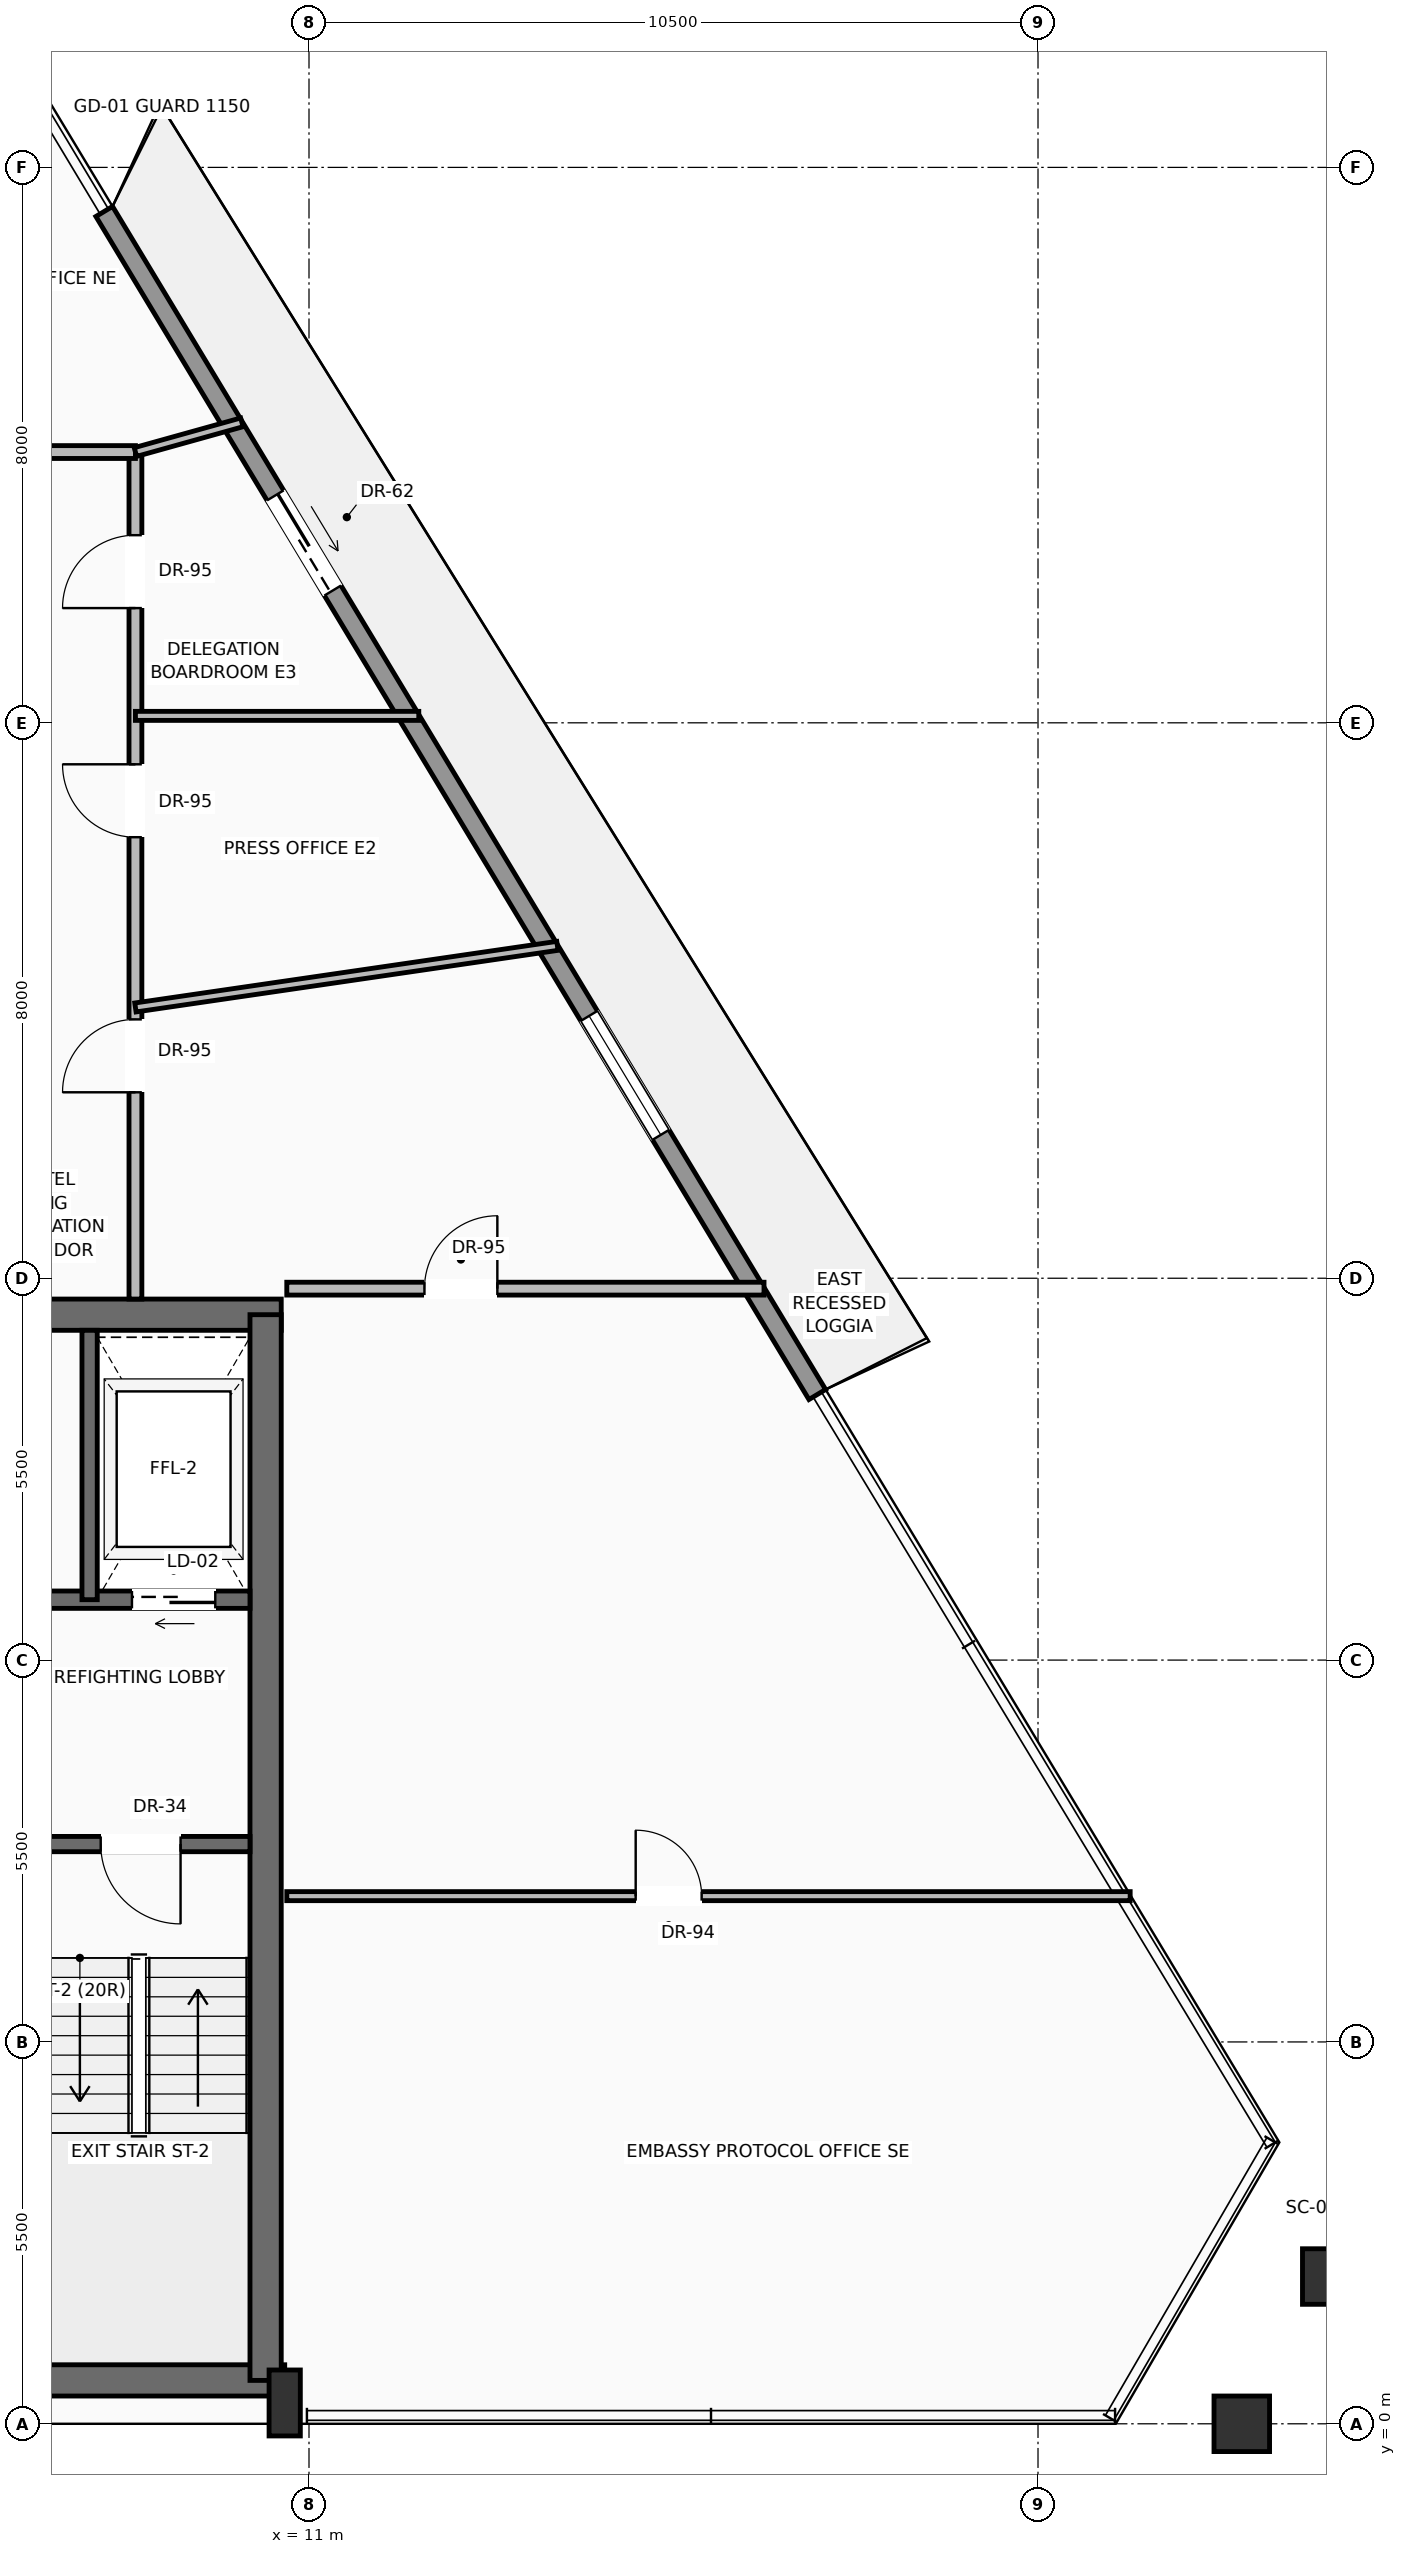
"""IFC4 building model, lengths in metres.
Left out: names, types, materials, properties, quantities, classifications, styles, units other than length and angle.
Written with IfcOpenShell. Run it as: python <this file> out.ifc"""

import sys

from ifc_helpers import new_model, si_unit, direction, frame, frame_2d, origin, origin_2d, place, context, subcontext, project, spatial, rectangle, hollow_rectangle, extrude, source, transform, mapped, element, fill, save


model = new_model("IFC4")
c1 = context("Model", 3, precision=1e-05, world=origin(), true_north=direction((0.0, 1.0)))
c2 = subcontext(c1, "Body", "Model", "MODEL_VIEW")
j1 = project(units=[si_unit("LENGTHUNIT", "METRE"), si_unit("PLANEANGLEUNIT", "RADIAN")], contexts=[c1])
p1 = place(None, origin())
s1 = spatial("IfcSite", under=j1, at=p1, CompositionType="ELEMENT")
p2 = place(p1, origin())
s2 = spatial("IfcBuilding", under=s1, at=p2, CompositionType="ELEMENT")
p3 = place(p2, frame((0.0, 0.0, 262.65)))
s3 = spatial("IfcBuildingStorey", under=s2, at=p3, CompositionType="ELEMENT", Elevation=262.65)
p4 = place(p3, frame((-10.65, 0.625, 0.0), z_axis=(0.0, 0.0, 1.0), x_axis=(1.0, 0.0, 0.0)))
e1 = element("IfcWall", 1, at=p4, inside=s3, PredefinedType="SHEAR", context=c2, shape_type="SweptSolid", body=[
    extrude(rectangle(XDim=21.3, YDim=0.45, at=frame_2d((10.65, 0.0))), origin(), (0.0, 0.0, 1.0), 3.24),
])
p5 = place(p3, frame((-10.6, 15.975, 0.0), z_axis=(0.0, 0.0, 1.0), x_axis=(1.0, 0.0, 0.0)))
e2 = element("IfcWall", 2, at=p5, inside=s3, PredefinedType="SHEAR", context=c2, shape_type="SweptSolid", body=[
    extrude(rectangle(XDim=21.2, YDim=0.45, at=frame_2d((10.6, 0.0))), origin(), (0.0, 0.0, 1.0), 3.24),
])
p6 = place(p5, frame((3.17, 0.0, 0.0)))
e3 = element("IfcOpeningElement", 3, at=p6, cuts=e2, PredefinedType="OPENING", context=c2, shape_type="SweptSolid", body=[
    extrude(rectangle(XDim=1.3, YDim=2.3, at=frame_2d((0.65, 1.15))), frame((0.0, 0.235, 0.0), z_axis=(0.0, -1.0, 0.0), x_axis=(1.0, 0.0, 0.0)), (0.0, 0.0, 1.0), 0.47),
])
p7 = place(p5, frame((9.6, 0.0, 0.0)))
e4 = element("IfcOpeningElement", 4, at=p7, cuts=e2, PredefinedType="OPENING", context=c2, shape_type="SweptSolid", body=[
    extrude(rectangle(XDim=2.0, YDim=2.4, at=frame_2d((1.0, 1.2))), frame((0.0, 0.235, 0.0), z_axis=(0.0, -1.0, 0.0), x_axis=(1.0, 0.0, 0.0)), (0.0, 0.0, 1.0), 0.47),
])
p8 = place(p3, frame((10.375, 0.625, 0.0), z_axis=(0.0, 0.0, 1.0), x_axis=(0.0, 1.0, 0.0)))
e5 = element("IfcWall", 5, at=p8, inside=s3, PredefinedType="SHEAR", context=c2, shape_type="SweptSolid", body=[
    extrude(rectangle(XDim=15.35, YDim=0.45, at=frame_2d((7.675, 0.0))), origin(), (0.0, 0.0, 1.0), 3.24),
])
m1 = source(origin(), c2, "Body", "SweptSolid", [
    extrude(rectangle(XDim=0.45, YDim=0.95, at=origin_2d()), origin(), (0.0, 0.0, 1.0), 3.45),
])
p9 = place(p3, frame((10.65, 0.3, 0.0), z_axis=(0.0, 0.0, 1.0), x_axis=(1.0, 0.0, 0.0)))
e6 = element("IfcColumn", 6, at=p9, inside=s3, PredefinedType="PILASTER", context=c2, shape_type="MappedRepresentation", body=[
    mapped(m1, transform((0.0, 0.0, 0.0), scale=1.0)),
])
m2 = source(origin(), c2, "Body", "SweptSolid", [
    extrude(hollow_rectangle(XDim=0.8, YDim=0.8, WallThickness=0.04, at=origin_2d()), origin(), (0.0, 0.0, 1.0), 3.441),
])
p10 = place(p3, frame((24.435, 0.0, 0.004), z_axis=(-0.001347898889, 0.0, 0.999999091584), x_axis=(1.0, 0.0, 0.0)))
e7 = element("IfcColumn", 7, at=p10, inside=s3, PredefinedType="COLUMN", context=c2, shape_type="MappedRepresentation", body=[
    mapped(m2, transform((0.0, 0.0, 0.0), scale=1.0)),
])
m3 = source(origin(), c2, "Body", "SweptSolid", [
    extrude(hollow_rectangle(XDim=0.8, YDim=0.8, WallThickness=0.04, at=origin_2d()), origin(), (0.0, 0.0, 1.0), 3.442),
])
p11 = place(p3, frame((25.709, 2.121, 0.004), z_axis=(-0.011490412596, -0.015887977911, 0.999807752809), x_axis=(0.810297504985, -0.586018731284, 0.0)))
e8 = element("IfcColumn", 8, at=p11, inside=s3, PredefinedType="COLUMN", context=c2, shape_type="MappedRepresentation", body=[
    mapped(m3, transform((0.0, 0.0, 0.0), scale=1.0)),
])
p12 = place(p3, frame((8.051, 31.865, 0.0), z_axis=(0.0, 0.0, 1.0), x_axis=(0.516203649231, -0.856465873529, 0.0)))
e9 = element("IfcWall", 9, at=p12, inside=s3, PredefinedType="SOLIDWALL", context=c2, shape_type="SweptSolid", body=[
    extrude(rectangle(XDim=19.896, YDim=0.28, at=frame_2d((9.948, 0.0))), origin(), (0.0, 0.0, 1.0), 2.82),
])
p13 = place(p12, frame((4.775, 0.0, 0.0)))
e10 = element("IfcOpeningElement", 10, at=p13, cuts=e9, PredefinedType="OPENING", context=c2, shape_type="SweptSolid", body=[
    extrude(rectangle(XDim=1.6, YDim=2.35, at=frame_2d((0.8, 1.175))), frame((0.0, 0.15, 0.0), z_axis=(0.0, -1.0, 0.0), x_axis=(1.0, 0.0, 0.0)), (0.0, 0.0, 1.0), 0.3),
])
p14 = place(p12, frame((13.529, 0.0, 0.9)))
e11 = element("IfcOpeningElement", 11, at=p14, cuts=e9, PredefinedType="OPENING", context=c2, shape_type="SweptSolid", body=[
    extrude(rectangle(XDim=2.0, YDim=1.75, at=frame_2d((1.0, 0.875))), frame((0.0, 0.15, 0.0), z_axis=(0.0, -1.0, 0.0), x_axis=(1.0, 0.0, 0.0)), (0.0, 0.0, 1.0), 0.3),
])
p15 = place(p3, frame((10.15, 8.35, 0.0), z_axis=(0.0, 0.0, 1.0), x_axis=(-1.0, 0.0, 0.0)))
e12 = element("IfcWall", 12, at=p15, inside=s3, PredefinedType="SOLIDWALL", context=c2, shape_type="SweptSolid", body=[
    extrude(rectangle(XDim=4.65, YDim=0.22, at=frame_2d((2.325, 0.0))), origin(), (0.0, 0.0, 1.0), 3.24),
])
p16 = place(p15, frame((1.0, 0.0, 0.0)))
e13 = element("IfcOpeningElement", 13, at=p16, cuts=e12, PredefinedType="OPENING", context=c2, shape_type="SweptSolid", body=[
    extrude(rectangle(XDim=1.15, YDim=2.2, at=frame_2d((0.575, 1.1))), frame((0.0, 0.12, 0.0), z_axis=(0.0, -1.0, 0.0), x_axis=(1.0, 0.0, 0.0)), (0.0, 0.0, 1.0), 0.24),
])
p17 = place(p3, frame((10.15, 11.87, 0.0), z_axis=(0.0, 0.0, 1.0), x_axis=(-1.0, 0.0, 0.0)))
e14 = element("IfcWall", 14, at=p17, inside=s3, PredefinedType="SOLIDWALL", context=c2, shape_type="SweptSolid", body=[
    extrude(rectangle(XDim=4.65, YDim=0.25, at=frame_2d((2.325, 0.0))), origin(), (0.0, 0.0, 1.0), 3.24),
])
p18 = place(p17, frame((0.5, 0.0, 0.0)))
e15 = element("IfcOpeningElement", 15, at=p18, cuts=e14, PredefinedType="OPENING", context=c2, shape_type="SweptSolid", body=[
    extrude(rectangle(XDim=1.2, YDim=2.25, at=frame_2d((0.6, 1.125))), frame((0.0, 0.135, 0.0), z_axis=(0.0, -1.0, 0.0), x_axis=(1.0, 0.0, 0.0)), (0.0, 0.0, 1.0), 0.27),
])
p19 = place(p3, frame((7.84, 11.87, 0.0), z_axis=(0.0, 0.0, 1.0), x_axis=(0.0, 1.0, 0.0)))
e16 = element("IfcWall", 16, at=p19, inside=s3, PredefinedType="SOLIDWALL", context=c2, shape_type="SweptSolid", body=[
    extrude(rectangle(XDim=3.88, YDim=0.22, at=frame_2d((1.94, 0.0))), origin(), (0.0, 0.0, 1.0), 3.24),
])
p20 = place(p3, frame((8.5, 16.2, 0.0), z_axis=(0.0, 0.0, 1.0), x_axis=(0.0, 1.0, 0.0)))
e17 = element("IfcWall", 17, at=p20, inside=s3, PredefinedType="PARTITIONING", context=c2, shape_type="SweptSolid", body=[
    extrude(rectangle(XDim=12.2, YDim=0.185, at=frame_2d((6.1, 0.0))), origin(), (0.0, 0.0, 1.0), 3.232),
])
p21 = place(p20, frame((2.978, 0.0, 0.0)))
e18 = element("IfcOpeningElement", 18, at=p21, cuts=e17, PredefinedType="OPENING", context=c2, shape_type="SweptSolid", body=[
    extrude(rectangle(XDim=1.05, YDim=2.25, at=frame_2d((0.525, 1.125))), frame((0.0, 0.103, 0.0), z_axis=(0.0, -1.0, 0.0), x_axis=(1.0, 0.0, 0.0)), (0.0, 0.0, 1.0), 0.205),
])
p22 = place(p20, frame((6.653, 0.0, 0.0)))
e19 = element("IfcOpeningElement", 19, at=p22, cuts=e17, PredefinedType="OPENING", context=c2, shape_type="SweptSolid", body=[
    extrude(rectangle(XDim=1.05, YDim=2.25, at=frame_2d((0.525, 1.125))), frame((0.0, 0.103, 0.0), z_axis=(0.0, -1.0, 0.0), x_axis=(1.0, 0.0, 0.0)), (0.0, 0.0, 1.0), 0.205),
])
p23 = place(p20, frame((9.953, 0.0, 0.0)))
e20 = element("IfcOpeningElement", 20, at=p23, cuts=e17, PredefinedType="OPENING", context=c2, shape_type="SweptSolid", body=[
    extrude(rectangle(XDim=1.05, YDim=2.25, at=frame_2d((0.525, 1.125))), frame((0.0, 0.103, 0.0), z_axis=(0.0, -1.0, 0.0), x_axis=(1.0, 0.0, 0.0)), (0.0, 0.0, 1.0), 0.205),
])
p24 = place(p3, frame((-8.3, 28.4, 0.0), z_axis=(0.0, 0.0, 1.0), x_axis=(1.0, 0.0, 0.0)))
e21 = element("IfcWall", 21, at=p24, inside=s3, PredefinedType="PARTITIONING", context=c2, shape_type="SweptSolid", body=[
    extrude(rectangle(XDim=16.8, YDim=0.185, at=frame_2d((8.4, 0.0))), origin(), (0.0, 0.0, 1.0), 3.232),
])
p25 = place(p24, frame((3.498, 0.0, 0.0)))
e22 = element("IfcOpeningElement", 22, at=p25, cuts=e21, PredefinedType="OPENING", context=c2, shape_type="SweptSolid", body=[
    extrude(rectangle(XDim=1.05, YDim=2.25, at=frame_2d((0.525, 1.125))), frame((0.0, 0.103, 0.0), z_axis=(0.0, -1.0, 0.0), x_axis=(1.0, 0.0, 0.0)), (0.0, 0.0, 1.0), 0.205),
])
p26 = place(p24, frame((8.998, 0.0, 0.0)))
e23 = element("IfcOpeningElement", 23, at=p26, cuts=e21, PredefinedType="OPENING", context=c2, shape_type="SweptSolid", body=[
    extrude(rectangle(XDim=1.05, YDim=2.25, at=frame_2d((0.525, 1.125))), frame((0.0, 0.103, 0.0), z_axis=(0.0, -1.0, 0.0), x_axis=(1.0, 0.0, 0.0)), (0.0, 0.0, 1.0), 0.205),
])
p27 = place(p24, frame((12.052, 0.0, 0.0)))
e24 = element("IfcOpeningElement", 24, at=p27, cuts=e21, PredefinedType="OPENING", context=c2, shape_type="SweptSolid", body=[
    extrude(rectangle(XDim=1.05, YDim=2.25, at=frame_2d((0.525, 1.125))), frame((0.0, 0.103, 0.0), z_axis=(0.0, -1.0, 0.0), x_axis=(1.0, 0.0, 0.0)), (0.0, 0.0, 1.0), 0.205),
])
p28 = place(p24, frame((14.498, 0.0, 0.0)))
e25 = element("IfcOpeningElement", 25, at=p28, cuts=e21, PredefinedType="OPENING", context=c2, shape_type="SweptSolid", body=[
    extrude(rectangle(XDim=1.05, YDim=2.25, at=frame_2d((0.525, 1.125))), frame((0.0, 0.103, 0.0), z_axis=(0.0, -1.0, 0.0), x_axis=(1.0, 0.0, 0.0)), (0.0, 0.0, 1.0), 0.205),
])
p29 = place(p24, frame((1.052, 0.0, 0.0)))
e26 = element("IfcOpeningElement", 26, at=p29, cuts=e21, PredefinedType="OPENING", context=c2, shape_type="SweptSolid", body=[
    extrude(rectangle(XDim=1.05, YDim=2.25, at=frame_2d((0.525, 1.125))), frame((0.0, 0.103, 0.0), z_axis=(0.0, -1.0, 0.0), x_axis=(1.0, 0.0, 0.0)), (0.0, 0.0, 1.0), 0.205),
])
p30 = place(p3, frame((10.68, 16.35, 0.0), z_axis=(0.0, 0.0, 1.0), x_axis=(1.0, 0.0, 0.0)))
e27 = element("IfcWall", 27, at=p30, inside=s3, PredefinedType="PARTITIONING", context=c2, shape_type="SweptSolid", body=[
    extrude(rectangle(XDim=6.874, YDim=0.185, at=frame_2d((3.437, 0.0))), origin(), (0.0, 0.0, 1.0), 3.232),
])
p31 = place(p30, frame((1.983, 0.0, 0.0)))
e28 = element("IfcOpeningElement", 28, at=p31, cuts=e27, PredefinedType="OPENING", context=c2, shape_type="SweptSolid", body=[
    extrude(rectangle(XDim=1.05, YDim=2.25, at=frame_2d((0.525, 1.125))), frame((0.0, 0.103, 0.0), z_axis=(0.0, -1.0, 0.0), x_axis=(1.0, 0.0, 0.0)), (0.0, 0.0, 1.0), 0.205),
])
p32 = place(p3, frame((8.5, 28.4, 0.0), z_axis=(0.0, 0.0, 1.0), x_axis=(0.963218462171, 0.268719545497, 0.0)))
e29 = element("IfcWall", 29, at=p32, inside=s3, PredefinedType="PARTITIONING", context=c2, shape_type="SweptSolid", body=[
    extrude(rectangle(XDim=1.592, YDim=0.13, at=frame_2d((0.796, 0.0))), origin(), (0.0, 0.0, 1.0), 3.232),
])
p33 = place(p3, frame((10.68, 7.6, 0.0), z_axis=(0.0, 0.0, 1.0), x_axis=(1.0, 0.0, 0.0)))
e30 = element("IfcWall", 30, at=p33, inside=s3, PredefinedType="PARTITIONING", context=c2, shape_type="SweptSolid", body=[
    extrude(rectangle(XDim=12.147, YDim=0.13, at=frame_2d((6.074, 0.0))), origin(), (0.0, 0.0, 1.0), 3.232),
])
p34 = place(p33, frame((5.025, 0.0, 0.0)))
e31 = element("IfcOpeningElement", 31, at=p34, cuts=e30, PredefinedType="OPENING", context=c2, shape_type="SweptSolid", body=[
    extrude(rectangle(XDim=0.95, YDim=2.2, at=frame_2d((0.475, 1.1))), frame((0.0, 0.075, 0.0), z_axis=(0.0, -1.0, 0.0), x_axis=(1.0, 0.0, 0.0)), (0.0, 0.0, 1.0), 0.15),
])
p35 = place(p3, frame((8.5, 20.4, 0.0), z_axis=(0.0, 0.0, 1.0), x_axis=(0.989507543015, 0.144481217869, 0.0)))
e32 = element("IfcWall", 32, at=p35, inside=s3, PredefinedType="PARTITIONING", context=c2, shape_type="SweptSolid", body=[
    extrude(rectangle(XDim=6.142, YDim=0.13, at=frame_2d((3.071, 0.0))), origin(), (0.0, 0.0, 1.0), 3.232),
])
p36 = place(p3, frame((8.5, 24.6, 0.0), z_axis=(0.0, 0.0, 1.0), x_axis=(1.0, 0.0, 0.0)))
e33 = element("IfcWall", 33, at=p36, inside=s3, PredefinedType="PARTITIONING", context=c2, shape_type="SweptSolid", body=[
    extrude(rectangle(XDim=4.081, YDim=0.13, at=frame_2d((2.041, 0.0))), origin(), (0.0, 0.0, 1.0), 2.683),
])
m4 = source(origin(), c2, "Body", "SweptSolid", [
    extrude(rectangle(XDim=1.6, YDim=2.35, at=frame_2d((0.8, 1.175))), frame((0.0, 0.025, 0.0), z_axis=(0.0, -1.0, 0.0), x_axis=(1.0, 0.0, 0.0)), (0.0, 0.0, 1.0), 0.05),
])
p37 = place(p13, origin())
e34 = element("IfcDoor", 34, at=p37, inside=s3, OperationType="SLIDING_TO_RIGHT", PredefinedType="DOOR", context=c2, shape_type="MappedRepresentation", body=[
    mapped(m4, transform((0.0, 0.0, 0.0), scale=1.0)),
])
fill(e10, e34)
m5 = source(origin(), c2, "Body", "SweptSolid", [
    extrude(rectangle(XDim=2.0, YDim=1.75, at=frame_2d((1.0, 0.875))), frame((0.0, 0.03, 0.0), z_axis=(0.0, -1.0, 0.0), x_axis=(1.0, 0.0, 0.0)), (0.0, 0.0, 1.0), 0.06),
])
p38 = place(p14, origin())
e35 = element("IfcWindow", 35, at=p38, inside=s3, PartitioningType="SINGLE_PANEL", PredefinedType="WINDOW", context=c2, shape_type="MappedRepresentation", body=[
    mapped(m5, transform((0.0, 0.0, 0.0), scale=1.0)),
])
fill(e11, e35)
m6 = source(origin(), c2, "Body", "SweptSolid", [
    extrude(rectangle(XDim=1.15, YDim=2.2, at=frame_2d((0.575, 1.1))), frame((0.0, 0.025, 0.0), z_axis=(0.0, -1.0, 0.0), x_axis=(1.0, 0.0, 0.0)), (0.0, 0.0, 1.0), 0.05),
])
p39 = place(p16, origin())
e36 = element("IfcDoor", 36, at=p39, inside=s3, OperationType="SINGLE_SWING_LEFT", PredefinedType="DOOR", context=c2, shape_type="MappedRepresentation", body=[
    mapped(m6, transform((0.0, 0.0, 0.0), scale=1.0)),
])
fill(e13, e36)
m7 = source(origin(), c2, "Body", "SweptSolid", [
    extrude(rectangle(XDim=1.2, YDim=2.25, at=frame_2d((0.6, 1.125))), frame((0.0, 0.025, 0.0), z_axis=(0.0, -1.0, 0.0), x_axis=(1.0, 0.0, 0.0)), (0.0, 0.0, 1.0), 0.05),
])
p40 = place(p18, origin())
e37 = element("IfcDoor", 37, at=p40, inside=s3, OperationType="SLIDING_TO_RIGHT", PredefinedType="DOOR", context=c2, shape_type="MappedRepresentation", body=[
    mapped(m7, transform((0.0, 0.0, 0.0), scale=1.0)),
])
fill(e15, e37)
m8 = source(origin(), c2, "Body", "SweptSolid", [
    extrude(rectangle(XDim=1.05, YDim=2.25, at=frame_2d((0.525, 1.125))), frame((0.0, 0.025, 0.0), z_axis=(0.0, -1.0, 0.0), x_axis=(1.0, 0.0, 0.0)), (0.0, 0.0, 1.0), 0.05),
])
p41 = place(p31, origin())
e38 = element("IfcDoor", 38, at=p41, inside=s3, OperationType="SINGLE_SWING_RIGHT", PredefinedType="DOOR", context=c2, shape_type="MappedRepresentation", body=[
    mapped(m8, transform((0.0, 0.0, 0.0), scale=1.0)),
])
fill(e28, e38)
m9 = source(origin(), c2, "Body", "SweptSolid", [
    extrude(rectangle(XDim=0.95, YDim=2.2, at=frame_2d((0.475, 1.1))), frame((0.0, 0.025, 0.0), z_axis=(0.0, -1.0, 0.0), x_axis=(1.0, 0.0, 0.0)), (0.0, 0.0, 1.0), 0.05),
])
p42 = place(p34, origin())
e39 = element("IfcDoor", 39, at=p42, inside=s3, OperationType="SINGLE_SWING_LEFT", PredefinedType="DOOR", context=c2, shape_type="MappedRepresentation", body=[
    mapped(m9, transform((0.0, 0.0, 0.0), scale=1.0)),
])
fill(e31, e39)
p43 = place(p21, origin())
e40 = element("IfcDoor", 40, at=p43, inside=s3, OperationType="SINGLE_SWING_LEFT", PredefinedType="DOOR", context=c2, shape_type="MappedRepresentation", body=[
    mapped(m8, transform((0.0, 0.0, 0.0), scale=1.0)),
])
fill(e18, e40)
p44 = place(p22, origin())
e41 = element("IfcDoor", 41, at=p44, inside=s3, OperationType="SINGLE_SWING_RIGHT", PredefinedType="DOOR", context=c2, shape_type="MappedRepresentation", body=[
    mapped(m8, transform((0.0, 0.0, 0.0), scale=1.0)),
])
fill(e19, e41)
p45 = place(p23, origin())
e42 = element("IfcDoor", 42, at=p45, inside=s3, OperationType="SINGLE_SWING_LEFT", PredefinedType="DOOR", context=c2, shape_type="MappedRepresentation", body=[
    mapped(m8, transform((0.0, 0.0, 0.0), scale=1.0)),
])
fill(e20, e42)
save(model, sys.argv[1])
